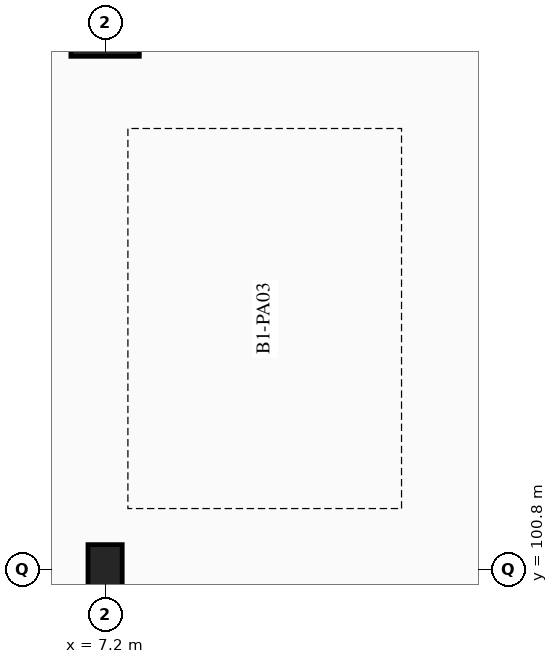
"""IFC4 building model, lengths in metres.
Left out: names, types, materials, properties, quantities, classifications, styles, units other than length and angle.
Written with IfcOpenShell. Run it as: python <this file> out.ifc"""

import sys

from ifc_helpers import new_model, si_unit, direction, frame, origin, origin_2d, place, context, subcontext, project, spatial, rectangle, extrude, element, save


model = new_model("IFC4")
c1 = context("Model", 3, precision=1e-05, world=origin(), true_north=direction((0.0, 1.0)))
c2 = subcontext(c1, "Body", "Model", "MODEL_VIEW")
j1 = project(units=[si_unit("LENGTHUNIT", "METRE"), si_unit("PLANEANGLEUNIT", "RADIAN")], contexts=[c1])
p1 = place(None, origin())
s1 = spatial("IfcSite", under=j1, at=p1, CompositionType="ELEMENT")
p2 = place(p1, origin())
s2 = spatial("IfcBuilding", under=s1, at=p2, CompositionType="ELEMENT")
p3 = place(p2, frame((0.0, 0.0, -4.5)))
s3 = spatial("IfcBuildingStorey", under=s2, at=p3, CompositionType="ELEMENT", Elevation=-4.5)
p4 = place(p3, frame((7.2, 100.8, -0.45), z_axis=(0.0, 0.0, 1.0), x_axis=(1.0, 0.0, 0.0)))
e1 = element("IfcColumn", 1, at=p4, inside=s3, PredefinedType="PILASTER", context=c2, shape_type="SweptSolid", body=[
    extrude(rectangle(XDim=0.45, YDim=0.65, at=origin_2d()), origin(), (0.0, 0.0, 1.0), 4.95),
])
p5 = place(p3, frame((7.2, 108.0, -0.45), z_axis=(0.0, 0.0, 1.0), x_axis=(1.0, 0.0, 0.0)))
e2 = element("IfcColumn", 2, at=p5, inside=s3, PredefinedType="COLUMN", context=c2, shape_type="SweptSolid", body=[
    extrude(rectangle(XDim=0.9, YDim=0.9, at=origin_2d()), origin(), (0.0, 0.0, 1.0), 4.95),
])
save(model, sys.argv[1])
